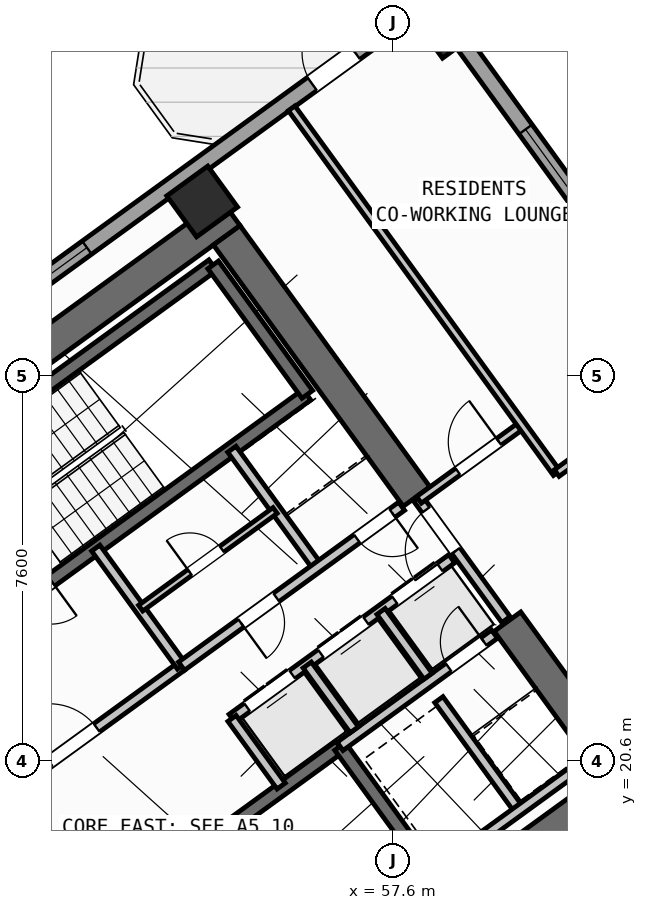
"""IFC4 building model, lengths in metres.
Left out: names, types, materials, properties, quantities, classifications, styles, units other than length and angle.
Written with IfcOpenShell. Run it as: python <this file> out.ifc"""

import sys

from ifc_helpers import new_model, si_unit, direction, frame, frame_2d, origin, origin_2d, place, context, subcontext, project, spatial, rectangle, hollow_rectangle, extrude, source, transform, mapped, element, fill, save


model = new_model("IFC4")
c1 = context("Model", 3, precision=1e-05, world=origin(), true_north=direction((0.0, 1.0)))
c2 = subcontext(c1, "Body", "Model", "MODEL_VIEW")
j1 = project(units=[si_unit("LENGTHUNIT", "METRE"), si_unit("PLANEANGLEUNIT", "RADIAN")], contexts=[c1])
p1 = place(None, origin())
s1 = spatial("IfcSite", under=j1, at=p1, CompositionType="ELEMENT")
p2 = place(p1, origin())
s2 = spatial("IfcBuilding", under=s1, at=p2, CompositionType="ELEMENT")
p3 = place(p2, frame((0.0, 0.0, 27.6)))
s3 = spatial("IfcBuildingStorey", under=s2, at=p3, CompositionType="ELEMENT", Elevation=27.6)
p4 = place(p3, frame((52.318, 13.11, 0.0), z_axis=(0.0, 0.0, 1.0), x_axis=(0.809019445368, 0.587781878776, 0.0)))
e1 = element("IfcWall", 1, at=p4, inside=s3, PredefinedType="SHEAR", context=c2, shape_type="SweptSolid", body=[
    extrude(rectangle(XDim=12.44, YDim=0.65, at=frame_2d((6.22, 0.0))), origin(), (0.0, 0.0, 1.0), 3.35),
])
p5 = place(p3, frame((44.325, 24.113, 0.0), z_axis=(0.0, 0.0, 1.0), x_axis=(0.809012664862, 0.58779121131, 0.0)))
e2 = element("IfcWall", 2, at=p5, inside=s3, PredefinedType="SHEAR", context=c2, shape_type="SweptSolid", body=[
    extrude(rectangle(XDim=12.44, YDim=0.65, at=frame_2d((6.22, 0.0))), origin(), (0.0, 0.0, 1.0), 3.35),
])
p6 = place(p3, frame((61.929, 20.494, 0.0), z_axis=(0.0, 0.0, 1.0), x_axis=(-0.58782982593, 0.808984607855, 0.0)))
e3 = element("IfcWall", 3, at=p6, inside=s3, PredefinedType="SHEAR", context=c2, shape_type="SweptSolid", body=[
    extrude(rectangle(XDim=3.525, YDim=0.65, at=frame_2d((1.762, 0.0))), origin(), (0.0, 0.0, 1.0), 3.35),
])
p7 = place(p3, frame((58.064, 25.813, 0.0), z_axis=(0.0, 0.0, 1.0), x_axis=(-0.58777996584, 0.809020835181, 0.0)))
e4 = element("IfcWall", 4, at=p7, inside=s3, PredefinedType="SHEAR", context=c2, shape_type="SweptSolid", body=[
    extrude(rectangle(XDim=6.375, YDim=0.65, at=frame_2d((3.188, 0.0))), origin(), (0.0, 0.0, 1.0), 3.35),
])
m1 = source(origin(), c2, "Body", "SweptSolid", [
    extrude(hollow_rectangle(XDim=1.0, YDim=1.0, WallThickness=0.04, at=origin_2d()), origin(), (0.0, 0.0, 1.0), 3.6),
])
for number, where, z_axis, x_axis in (
    (5, (53.832, 31.638, 0.0), (0.0, 0.0, 1.0), (0.809, 0.588, 0.0)),
    (6, (58.686, 35.165, 0.0), (0.0, 0.0, 1.0), (0.809, 0.588, 0.0)),
):
    element("IfcColumn", number, at=place(p3, frame(where, z_axis=z_axis, x_axis=x_axis)), inside=s3, PredefinedType="COLUMN", context=c2, shape_type="MappedRepresentation", body=[
        mapped(m1, transform((0.0, 0.0, 0.0), scale=1.0)),
    ])
p8 = place(p3, frame((43.938, 25.192, 0.0), z_axis=(0.0, 0.0, 1.0), x_axis=(0.809016324578, 0.587786174187, 0.0)))
e7 = element("IfcWall", 7, at=p8, inside=s3, PredefinedType="STANDARD", context=c2, shape_type="SweptSolid", body=[
    extrude(rectangle(XDim=17.587, YDim=0.32, at=frame_2d((8.794, 0.0))), origin(), (0.0, 0.0, 1.0), 3.35),
])
p9 = place(p8, frame((14.914, 0.0, 0.0)))
e8 = element("IfcOpeningElement", 8, at=p9, cuts=e7, PredefinedType="OPENING", context=c2, shape_type="SweptSolid", body=[
    extrude(rectangle(XDim=1.05, YDim=2.15, at=frame_2d((0.525, 1.075))), frame((0.0, 0.17, 0.0), z_axis=(0.0, -1.0, 0.0), x_axis=(1.0, 0.0, 0.0)), (0.0, 0.0, 1.0), 0.34),
])
p10 = place(p8, frame((2.169, 0.0, 0.8)))
e9 = element("IfcOpeningElement", 9, at=p10, cuts=e7, PredefinedType="OPENING", context=c2, shape_type="SweptSolid", body=[
    extrude(rectangle(XDim=2.1, YDim=1.55, at=frame_2d((1.05, 0.775))), frame((0.0, 0.17, 0.0), z_axis=(0.0, -1.0, 0.0), x_axis=(1.0, 0.0, 0.0)), (0.0, 0.0, 1.0), 0.34),
])
p11 = place(p8, frame((7.319, 0.0, 0.8)))
e10 = element("IfcOpeningElement", 10, at=p11, cuts=e7, PredefinedType="OPENING", context=c2, shape_type="SweptSolid", body=[
    extrude(rectangle(XDim=2.1, YDim=1.55, at=frame_2d((1.05, 0.775))), frame((0.0, 0.17, 0.0), z_axis=(0.0, -1.0, 0.0), x_axis=(1.0, 0.0, 0.0)), (0.0, 0.0, 1.0), 0.34),
])
p12 = place(p3, frame((58.455, 35.484, 0.0), z_axis=(0.0, 0.0, 1.0), x_axis=(0.587783625747, -0.809018176127, 0.0)))
e11 = element("IfcWall", 11, at=p12, inside=s3, PredefinedType="STANDARD", context=c2, shape_type="SweptSolid", body=[
    extrude(rectangle(XDim=21.587, YDim=0.32, at=frame_2d((10.794, 0.0))), origin(), (0.0, 0.0, 1.0), 2.725),
])
p13 = place(p12, frame((2.994, 0.0, 0.8)))
e12 = element("IfcOpeningElement", 12, at=p13, cuts=e11, PredefinedType="OPENING", context=c2, shape_type="SweptSolid", body=[
    extrude(rectangle(XDim=2.1, YDim=1.55, at=frame_2d((1.05, 0.775))), frame((0.0, 0.17, 0.0), z_axis=(0.0, -1.0, 0.0), x_axis=(1.0, 0.0, 0.0)), (0.0, 0.0, 1.0), 0.34),
])
p14 = place(p12, frame((11.934, 0.0, 0.85)))
e13 = element("IfcOpeningElement", 13, at=p14, cuts=e11, PredefinedType="OPENING", context=c2, shape_type="SweptSolid", body=[
    extrude(rectangle(XDim=1.8, YDim=1.5, at=frame_2d((0.9, 0.75))), frame((0.0, 0.17, 0.0), z_axis=(0.0, -1.0, 0.0), x_axis=(1.0, 0.0, 0.0)), (0.0, 0.0, 1.0), 0.34),
])
p15 = place(p12, frame((18.535, 0.0, 0.85)))
e14 = element("IfcOpeningElement", 14, at=p15, cuts=e11, PredefinedType="OPENING", context=c2, shape_type="SweptSolid", body=[
    extrude(rectangle(XDim=1.5, YDim=1.5, at=frame_2d((0.75, 0.75))), frame((0.0, 0.17, 0.0), z_axis=(0.0, -1.0, 0.0), x_axis=(1.0, 0.0, 0.0)), (0.0, 0.0, 1.0), 0.34),
])
p16 = place(p3, frame((48.006, 25.996, 0.0), z_axis=(0.0, 0.0, 1.0), x_axis=(0.80901903764, 0.587782439969, 0.0)))
e15 = element("IfcWall", 15, at=p16, inside=s3, PredefinedType="SHEAR", context=c2, shape_type="SweptSolid", body=[
    extrude(rectangle(XDim=7.46, YDim=0.26, at=frame_2d((3.73, 0.0))), origin(), (0.0, 0.0, 1.0), 3.35),
])
p17 = place(p3, frame((49.863, 23.44, 0.0), z_axis=(0.0, 0.0, 1.0), x_axis=(0.809003474932, 0.587803859759, 0.0)))
e16 = element("IfcWall", 16, at=p17, inside=s3, PredefinedType="SHEAR", context=c2, shape_type="SweptSolid", body=[
    extrude(rectangle(XDim=7.46, YDim=0.26, at=frame_2d((3.73, 0.0))), origin(), (0.0, 0.0, 1.0), 3.35),
])
p18 = place(p17, frame((0.36, 0.0, 0.0)))
e17 = element("IfcOpeningElement", 17, at=p18, cuts=e16, PredefinedType="OPENING", context=c2, shape_type="SweptSolid", body=[
    extrude(rectangle(XDim=0.86, YDim=2.05, at=frame_2d((0.43, 1.025))), frame((0.0, 0.14, 0.0), z_axis=(0.0, -1.0, 0.0), x_axis=(1.0, 0.0, 0.0)), (0.0, 0.0, 1.0), 0.28),
])
p19 = place(p3, frame((55.906, 27.831, 0.0), z_axis=(0.0, 0.0, 1.0), x_axis=(-0.587804123638, 0.809003283204, 0.0)))
e18 = element("IfcWall", 18, at=p19, inside=s3, PredefinedType="SHEAR", context=c2, shape_type="SweptSolid", body=[
    extrude(rectangle(XDim=3.16, YDim=0.26, at=frame_2d((1.58, 0.0))), origin(), (0.0, 0.0, 1.0), 3.35),
])
p20 = place(p3, frame((50.615, 16.57, 0.0), z_axis=(0.0, 0.0, 1.0), x_axis=(0.809028366311, 0.587769599847, 0.0)))
e19 = element("IfcWall", 19, at=p20, inside=s3, PredefinedType="SHEAR", context=c2, shape_type="SweptSolid", body=[
    extrude(rectangle(XDim=7.33, YDim=0.26, at=frame_2d((3.665, 0.0))), origin(), (0.0, 0.0, 1.0), 3.35),
])
p21 = place(p20, frame((0.22, 0.0, 0.0)))
e20 = element("IfcOpeningElement", 20, at=p21, cuts=e19, PredefinedType="OPENING", context=c2, shape_type="SweptSolid", body=[
    extrude(rectangle(XDim=1.1, YDim=2.1, at=frame_2d((0.55, 1.05))), frame((0.0, 0.14, 0.0), z_axis=(0.0, -1.0, 0.0), x_axis=(1.0, 0.0, 0.0)), (0.0, 0.0, 1.0), 0.28),
])
p22 = place(p3, frame((58.41, 18.327, 0.0), z_axis=(0.0, 0.0, 1.0), x_axis=(-0.58776738483, 0.809029975545, 0.0)))
e21 = element("IfcWall", 21, at=p22, inside=s3, PredefinedType="SHEAR", context=c2, shape_type="SweptSolid", body=[
    extrude(rectangle(XDim=3.16, YDim=0.26, at=frame_2d((1.58, 0.0))), origin(), (0.0, 0.0, 1.0), 3.35),
])
p23 = place(p3, frame((48.799, 19.107, 0.0), z_axis=(0.0, 0.0, 1.0), x_axis=(0.809012959416, 0.587790805897, 0.0)))
e22 = element("IfcWall", 22, at=p23, inside=s3, PredefinedType="STANDARD", context=c2, shape_type="SweptSolid", body=[
    extrude(rectangle(XDim=5.718, YDim=0.2, at=frame_2d((2.859, 0.0))), origin(), (0.0, 0.0, 1.0), 3.34),
])
p24 = place(p23, frame((2.498, 0.0, 0.0)))
e23 = element("IfcOpeningElement", 23, at=p24, cuts=e22, PredefinedType="OPENING", context=c2, shape_type="SweptSolid", body=[
    extrude(rectangle(XDim=1.15, YDim=2.1, at=frame_2d((0.575, 1.05))), frame((0.0, 0.11, 0.0), z_axis=(0.0, -1.0, 0.0), x_axis=(1.0, 0.0, 0.0)), (0.0, 0.0, 1.0), 0.22),
])
p25 = place(p3, frame((56.553, 20.884, 0.0), z_axis=(0.0, 0.0, 1.0), x_axis=(0.809035789462, 0.587759382205, 0.0)))
e24 = element("IfcWall", 24, at=p25, inside=s3, PredefinedType="STANDARD", context=c2, shape_type="SweptSolid", body=[
    extrude(rectangle(XDim=3.768, YDim=0.2, at=frame_2d((1.884, 0.0))), origin(), (0.0, 0.0, 1.0), 3.34),
])
p26 = place(p25, frame((2.65, 0.0, 0.0)))
e25 = element("IfcOpeningElement", 25, at=p26, cuts=e24, PredefinedType="OPENING", context=c2, shape_type="SweptSolid", body=[
    extrude(rectangle(XDim=0.86, YDim=2.05, at=frame_2d((0.43, 1.025))), frame((0.0, 0.11, 0.0), z_axis=(0.0, -1.0, 0.0), x_axis=(1.0, 0.0, 0.0)), (0.0, 0.0, 1.0), 0.22),
])
p27 = place(p3, frame((54.421, 21.436, 0.0), z_axis=(0.0, 0.0, 1.0), x_axis=(0.809013710463, 0.587789772183, 0.0)))
e26 = element("IfcWall", 26, at=p27, inside=s3, PredefinedType="STANDARD", context=c2, shape_type="SweptSolid", body=[
    extrude(rectangle(XDim=5.36, YDim=0.2, at=frame_2d((2.68, 0.0))), origin(), (0.0, 0.0, 1.0), 3.34),
])
p28 = place(p27, frame((0.37, 0.0, 0.0)))
e27 = element("IfcOpeningElement", 27, at=p28, cuts=e26, PredefinedType="OPENING", context=c2, shape_type="SweptSolid", body=[
    extrude(rectangle(XDim=1.1, YDim=2.15, at=frame_2d((0.55, 1.075))), frame((0.0, 0.11, 0.0), z_axis=(0.0, -1.0, 0.0), x_axis=(1.0, 0.0, 0.0)), (0.0, 0.0, 1.0), 0.22),
])
p29 = place(p27, frame((2.17, 0.0, 0.0)))
e28 = element("IfcOpeningElement", 28, at=p29, cuts=e26, PredefinedType="OPENING", context=c2, shape_type="SweptSolid", body=[
    extrude(rectangle(XDim=1.1, YDim=2.15, at=frame_2d((0.55, 1.075))), frame((0.0, 0.11, 0.0), z_axis=(0.0, -1.0, 0.0), x_axis=(1.0, 0.0, 0.0)), (0.0, 0.0, 1.0), 0.22),
])
p30 = place(p27, frame((3.97, 0.0, 0.0)))
e29 = element("IfcOpeningElement", 29, at=p30, cuts=e26, PredefinedType="OPENING", context=c2, shape_type="SweptSolid", body=[
    extrude(rectangle(XDim=1.1, YDim=2.15, at=frame_2d((0.55, 1.075))), frame((0.0, 0.11, 0.0), z_axis=(0.0, -1.0, 0.0), x_axis=(1.0, 0.0, 0.0)), (0.0, 0.0, 1.0), 0.22),
])
p31 = place(p3, frame((55.391, 20.102, 0.0), z_axis=(0.0, 0.0, 1.0), x_axis=(-0.58778447739, 0.809017557374, 0.0)))
e30 = element("IfcWall", 30, at=p31, inside=s3, PredefinedType="STANDARD", context=c2, shape_type="SweptSolid", body=[
    extrude(rectangle(XDim=1.65, YDim=0.2, at=frame_2d((0.825, 0.0))), origin(), (0.0, 0.0, 1.0), 3.34),
])
p32 = place(p3, frame((56.834, 21.212, 0.0), z_axis=(0.0, 0.0, 1.0), x_axis=(-0.58776738483, 0.809029975545, 0.0)))
e31 = element("IfcWall", 31, at=p32, inside=s3, PredefinedType="STANDARD", context=c2, shape_type="SweptSolid", body=[
    extrude(rectangle(XDim=1.58, YDim=0.2, at=frame_2d((0.79, 0.0))), origin(), (0.0, 0.0, 1.0), 3.34),
])
p33 = place(p3, frame((58.29, 22.27, 0.0), z_axis=(0.0, 0.0, 1.0), x_axis=(-0.587840865826, 0.808976585857, 0.0)))
e32 = element("IfcWall", 32, at=p33, inside=s3, PredefinedType="STANDARD", context=c2, shape_type="SweptSolid", body=[
    extrude(rectangle(XDim=1.58, YDim=0.2, at=frame_2d((0.79, 0.0))), origin(), (0.0, 0.0, 1.0), 3.34),
])
p34 = place(p3, frame((60.067, 19.655, 0.0), z_axis=(0.0, 0.0, 1.0), x_axis=(-0.587800520745, 0.809005900975, 0.0)))
e33 = element("IfcWall", 33, at=p34, inside=s3, PredefinedType="STANDARD", context=c2, shape_type="SweptSolid", body=[
    extrude(rectangle(XDim=2.66, YDim=0.2, at=frame_2d((1.33, 0.0))), origin(), (0.0, 0.0, 1.0), 3.34),
])
p35 = place(p3, frame((58.472, 18.447, 0.0), z_axis=(0.0, 0.0, 1.0), x_axis=(0.809022487728, 0.587777691266, 0.0)))
e34 = element("IfcWall", 34, at=p35, inside=s3, PredefinedType="STANDARD", context=c2, shape_type="SweptSolid", body=[
    extrude(rectangle(XDim=3.648, YDim=0.2, at=frame_2d((1.824, 0.0))), origin(), (0.0, 0.0, 1.0), 3.34),
])
p36 = place(p3, frame((53.425, 22.468, 0.0), z_axis=(0.0, 0.0, 1.0), x_axis=(-0.5877230039, 0.809062216821, 0.0)))
e35 = element("IfcWall", 35, at=p36, inside=s3, PredefinedType="STANDARD", context=c2, shape_type="SweptSolid", body=[
    extrude(rectangle(XDim=2.88, YDim=0.2, at=frame_2d((1.44, 0.0))), origin(), (0.0, 0.0, 1.0), 3.34),
])
p37 = place(p3, frame((56.111, 24.419, 0.0), z_axis=(0.0, 0.0, 1.0), x_axis=(-0.58777848983, 0.809021907548, 0.0)))
e36 = element("IfcWall", 36, at=p37, inside=s3, PredefinedType="STANDARD", context=c2, shape_type="SweptSolid", body=[
    extrude(rectangle(XDim=2.88, YDim=0.2, at=frame_2d((1.44, 0.0))), origin(), (0.0, 0.0, 1.0), 3.34),
])
p38 = place(p3, frame((53.425, 22.468, 0.0), z_axis=(0.0, 0.0, 1.0), x_axis=(0.80902705128, 0.587771409902, 0.0)))
e37 = element("IfcWall", 37, at=p38, inside=s3, PredefinedType="STANDARD", context=c2, shape_type="SweptSolid", body=[
    extrude(rectangle(XDim=5.368, YDim=0.2, at=frame_2d((2.684, 0.0))), origin(), (0.0, 0.0, 1.0), 3.34),
])
p39 = place(p38, frame((4.28, 0.0, 0.0)))
e38 = element("IfcOpeningElement", 38, at=p39, cuts=e37, PredefinedType="OPENING", context=c2, shape_type="SweptSolid", body=[
    extrude(rectangle(XDim=0.86, YDim=2.05, at=frame_2d((0.43, 1.025))), frame((0.0, 0.11, 0.0), z_axis=(0.0, -1.0, 0.0), x_axis=(1.0, 0.0, 0.0)), (0.0, 0.0, 1.0), 0.22),
])
p40 = place(p38, frame((1.45, 0.0, 0.0)))
e39 = element("IfcOpeningElement", 39, at=p40, cuts=e37, PredefinedType="OPENING", context=c2, shape_type="SweptSolid", body=[
    extrude(rectangle(XDim=0.86, YDim=2.05, at=frame_2d((0.43, 1.025))), frame((0.0, 0.11, 0.0), z_axis=(0.0, -1.0, 0.0), x_axis=(1.0, 0.0, 0.0)), (0.0, 0.0, 1.0), 0.22),
])
p41 = place(p3, frame((52.618, 23.612, 0.0), z_axis=(0.0, 0.0, 1.0), x_axis=(0.809009587469, 0.587795446889, 0.0)))
e40 = element("IfcWall", 40, at=p41, inside=s3, PredefinedType="PLUMBINGWALL", context=c2, shape_type="SweptSolid", body=[
    extrude(rectangle(XDim=3.28, YDim=0.14, at=frame_2d((1.64, 0.0))), origin(), (0.0, 0.0, 1.0), 3.34),
])
p42 = place(p41, frame((1.2, 0.0, 0.0)))
e41 = element("IfcOpeningElement", 41, at=p42, cuts=e40, PredefinedType="OPENING", context=c2, shape_type="SweptSolid", body=[
    extrude(rectangle(XDim=0.78, YDim=2.05, at=frame_2d((0.39, 1.025))), frame((0.0, 0.08, 0.0), z_axis=(0.0, -1.0, 0.0), x_axis=(1.0, 0.0, 0.0)), (0.0, 0.0, 1.0), 0.16),
])
p43 = place(p3, frame((59.827, 23.386, 0.0), z_axis=(0.0, 0.0, 1.0), x_axis=(-0.587803840107, 0.809003489211, 0.0)))
e42 = element("IfcWall", 42, at=p43, inside=s3, PredefinedType="STANDARD", context=c2, shape_type="SweptSolid", body=[
    extrude(rectangle(XDim=2.96, YDim=0.2, at=frame_2d((1.48, 0.0))), origin(), (0.0, 0.0, 1.0), 3.34),
])
p44 = place(p43, frame((1.68, 0.0, 0.0)))
e43 = element("IfcOpeningElement", 43, at=p44, cuts=e42, PredefinedType="OPENING", context=c2, shape_type="SweptSolid", body=[
    extrude(rectangle(XDim=1.0, YDim=2.1, at=frame_2d((0.5, 1.05))), frame((0.0, 0.11, 0.0), z_axis=(0.0, -1.0, 0.0), x_axis=(1.0, 0.0, 0.0)), (0.0, 0.0, 1.0), 0.22),
])
p45 = place(p3, frame((58.111, 25.749, 0.0), z_axis=(0.0, 0.0, 1.0), x_axis=(0.809000999347, 0.58780726693, 0.0)))
e44 = element("IfcWall", 44, at=p45, inside=s3, PredefinedType="PARTITIONING", context=c2, shape_type="SweptSolid", body=[
    extrude(rectangle(XDim=2.51, YDim=0.16, at=frame_2d((1.255, 0.0))), origin(), (0.0, 0.0, 1.0), 2.725),
])
p46 = place(p45, frame((0.95, 0.0, 0.0)))
e45 = element("IfcOpeningElement", 45, at=p46, cuts=e44, PredefinedType="OPENING", context=c2, shape_type="SweptSolid", body=[
    extrude(rectangle(XDim=1.0, YDim=2.1, at=frame_2d((0.5, 1.05))), frame((0.0, 0.09, 0.0), z_axis=(0.0, -1.0, 0.0), x_axis=(1.0, 0.0, 0.0)), (0.0, 0.0, 1.0), 0.18),
])
p47 = place(p3, frame((60.829, 26.278, 0.0), z_axis=(0.0, 0.0, 1.0), x_axis=(-0.587781800813, 0.80901950201, 0.0)))
e46 = element("IfcWall", 46, at=p47, inside=s3, PredefinedType="PARTITIONING", context=c2, shape_type="SweptSolid", body=[
    extrude(rectangle(XDim=8.9, YDim=0.16, at=frame_2d((4.45, 0.0))), origin(), (0.0, 0.0, 1.0), 3.34),
])
p48 = place(p3, frame((60.829, 26.278, 0.0), z_axis=(0.0, 0.0, 1.0), x_axis=(0.809003564202, 0.587803736896, 0.0)))
e47 = element("IfcWall", 47, at=p48, inside=s3, PredefinedType="PARTITIONING", context=c2, shape_type="SweptSolid", body=[
    extrude(rectangle(XDim=3.63, YDim=0.16, at=frame_2d((1.815, 0.0))), origin(), (0.0, 0.0, 1.0), 3.34),
])
p49 = place(p48, frame((1.305, 0.0, 0.0)))
e48 = element("IfcOpeningElement", 48, at=p49, cuts=e47, PredefinedType="OPENING", context=c2, shape_type="SweptSolid", body=[
    extrude(rectangle(XDim=1.0, YDim=2.1, at=frame_2d((0.5, 1.05))), frame((0.0, 0.09, 0.0), z_axis=(0.0, -1.0, 0.0), x_axis=(1.0, 0.0, 0.0)), (0.0, 0.0, 1.0), 0.18),
])
p50 = place(p3, frame((53.705, 11.126, 0.0), z_axis=(0.0, 0.0, 1.0), x_axis=(0.809014504436, 0.587788679384, 0.0)))
e49 = element("IfcWall", 49, at=p50, inside=s3, PredefinedType="PARTITIONING", context=c2, shape_type="SweptSolid", body=[
    extrude(rectangle(XDim=14.67, YDim=0.16, at=frame_2d((7.335, 0.0))), origin(), (0.0, 0.0, 1.0), 3.34),
])
p51 = place(p50, frame((10.2, 0.0, 0.0)))
e50 = element("IfcOpeningElement", 50, at=p51, cuts=e49, PredefinedType="OPENING", context=c2, shape_type="SweptSolid", body=[
    extrude(rectangle(XDim=1.0, YDim=2.1, at=frame_2d((0.5, 1.05))), frame((0.0, 0.09, 0.0), z_axis=(0.0, -1.0, 0.0), x_axis=(1.0, 0.0, 0.0)), (0.0, 0.0, 1.0), 0.18),
])
m2 = source(origin(), c2, "Body", "SweptSolid", [
    extrude(rectangle(XDim=1.05, YDim=2.15, at=frame_2d((0.525, 1.075))), frame((0.0, 0.025, 0.0), z_axis=(0.0, -1.0, 0.0), x_axis=(1.0, 0.0, 0.0)), (0.0, 0.0, 1.0), 0.05),
])
p52 = place(p9, origin())
e51 = element("IfcDoor", 51, at=p52, inside=s3, OperationType="SINGLE_SWING_RIGHT", PredefinedType="DOOR", context=c2, shape_type="MappedRepresentation", body=[
    mapped(m2, transform((0.0, 0.0, 0.0), scale=1.0)),
])
fill(e8, e51)
m3 = source(origin(), c2, "Body", "SweptSolid", [
    extrude(rectangle(XDim=2.1, YDim=1.55, at=frame_2d((1.05, 0.775))), frame((0.0, 0.03, 0.0), z_axis=(0.0, -1.0, 0.0), x_axis=(1.0, 0.0, 0.0)), (0.0, 0.0, 1.0), 0.06),
])
p53 = place(p11, origin())
e52 = element("IfcWindow", 52, at=p53, inside=s3, PartitioningType="SINGLE_PANEL", PredefinedType="WINDOW", context=c2, shape_type="MappedRepresentation", body=[
    mapped(m3, transform((0.0, 0.0, 0.0), scale=1.0)),
])
fill(e10, e52)
p54 = place(p13, origin())
e53 = element("IfcWindow", 53, at=p54, inside=s3, PartitioningType="SINGLE_PANEL", PredefinedType="WINDOW", context=c2, shape_type="MappedRepresentation", body=[
    mapped(m3, transform((0.0, 0.0, 0.0), scale=1.0)),
])
fill(e12, e53)
m4 = source(origin(), c2, "Body", "SweptSolid", [
    extrude(rectangle(XDim=1.15, YDim=2.1, at=frame_2d((0.575, 1.05))), frame((0.0, 0.025, 0.0), z_axis=(0.0, -1.0, 0.0), x_axis=(1.0, 0.0, 0.0)), (0.0, 0.0, 1.0), 0.05),
])
p55 = place(p24, origin())
e54 = element("IfcDoor", 54, at=p55, inside=s3, OperationType="SINGLE_SWING_LEFT", PredefinedType="DOOR", context=c2, shape_type="MappedRepresentation", body=[
    mapped(m4, transform((0.0, 0.0, 0.0), scale=1.0)),
])
fill(e23, e54)
m5 = source(origin(), c2, "Body", "SweptSolid", [
    extrude(rectangle(XDim=1.1, YDim=2.15, at=frame_2d((0.55, 1.075))), frame((0.0, 0.025, 0.0), z_axis=(0.0, -1.0, 0.0), x_axis=(1.0, 0.0, 0.0)), (0.0, 0.0, 1.0), 0.05),
])
p56 = place(p28, origin())
e55 = element("IfcDoor", 55, at=p56, inside=s3, OperationType="DOUBLE_DOOR_SLIDING", PredefinedType="DOOR", context=c2, shape_type="MappedRepresentation", body=[
    mapped(m5, transform((0.0, 0.0, 0.0), scale=1.0)),
])
fill(e27, e55)
p57 = place(p29, origin())
e56 = element("IfcDoor", 56, at=p57, inside=s3, OperationType="DOUBLE_DOOR_SLIDING", PredefinedType="DOOR", context=c2, shape_type="MappedRepresentation", body=[
    mapped(m5, transform((0.0, 0.0, 0.0), scale=1.0)),
])
fill(e28, e56)
p58 = place(p30, origin())
e57 = element("IfcDoor", 57, at=p58, inside=s3, OperationType="DOUBLE_DOOR_SLIDING", PredefinedType="DOOR", context=c2, shape_type="MappedRepresentation", body=[
    mapped(m5, transform((0.0, 0.0, 0.0), scale=1.0)),
])
fill(e29, e57)
m6 = source(origin(), c2, "Body", "SweptSolid", [
    extrude(rectangle(XDim=0.86, YDim=2.05, at=frame_2d((0.43, 1.025))), frame((0.0, 0.025, 0.0), z_axis=(0.0, -1.0, 0.0), x_axis=(1.0, 0.0, 0.0)), (0.0, 0.0, 1.0), 0.05),
])
p59 = place(p26, origin())
e58 = element("IfcDoor", 58, at=p59, inside=s3, OperationType="SINGLE_SWING_RIGHT", PredefinedType="DOOR", context=c2, shape_type="MappedRepresentation", body=[
    mapped(m6, transform((0.0, 0.0, 0.0), scale=1.0)),
])
fill(e25, e58)
p60 = place(p39, frame((0.86, 0.0, 0.0), z_axis=(0.0, 0.0, 1.0), x_axis=(-1.0, 0.0, 0.0)))
e59 = element("IfcDoor", 59, at=p60, inside=s3, OperationType="SINGLE_SWING_LEFT", PredefinedType="DOOR", context=c2, shape_type="MappedRepresentation", body=[
    mapped(m6, transform((0.0, 0.0, 0.0), scale=1.0)),
])
fill(e38, e59)
p61 = place(p40, frame((0.86, 0.0, 0.0), z_axis=(0.0, 0.0, 1.0), x_axis=(-1.0, 0.0, 0.0)))
e60 = element("IfcDoor", 60, at=p61, inside=s3, OperationType="SINGLE_SWING_RIGHT", PredefinedType="DOOR", context=c2, shape_type="MappedRepresentation", body=[
    mapped(m6, transform((0.0, 0.0, 0.0), scale=1.0)),
])
fill(e39, e60)
m7 = source(origin(), c2, "Body", "SweptSolid", [
    extrude(rectangle(XDim=0.78, YDim=2.05, at=frame_2d((0.39, 1.025))), frame((0.0, 0.025, 0.0), z_axis=(0.0, -1.0, 0.0), x_axis=(1.0, 0.0, 0.0)), (0.0, 0.0, 1.0), 0.05),
])
p62 = place(p42, origin())
e61 = element("IfcDoor", 61, at=p62, inside=s3, OperationType="SINGLE_SWING_LEFT", PredefinedType="DOOR", context=c2, shape_type="MappedRepresentation", body=[
    mapped(m7, transform((0.0, 0.0, 0.0), scale=1.0)),
])
fill(e41, e61)
m8 = source(origin(), c2, "Body", "SweptSolid", [
    extrude(rectangle(XDim=1.0, YDim=2.1, at=frame_2d((0.5, 1.05))), frame((0.0, 0.025, 0.0), z_axis=(0.0, -1.0, 0.0), x_axis=(1.0, 0.0, 0.0)), (0.0, 0.0, 1.0), 0.05),
])
p63 = place(p46, origin())
e62 = element("IfcDoor", 62, at=p63, inside=s3, OperationType="SINGLE_SWING_RIGHT", PredefinedType="DOOR", context=c2, shape_type="MappedRepresentation", body=[
    mapped(m8, transform((0.0, 0.0, 0.0), scale=1.0)),
])
fill(e45, e62)
p64 = place(p44, origin())
e63 = element("IfcDoor", 63, at=p64, inside=s3, OperationType="SINGLE_SWING_LEFT", PredefinedType="DOOR", context=c2, shape_type="MappedRepresentation", body=[
    mapped(m8, transform((0.0, 0.0, 0.0), scale=1.0)),
])
fill(e43, e63)
save(model, sys.argv[1])
